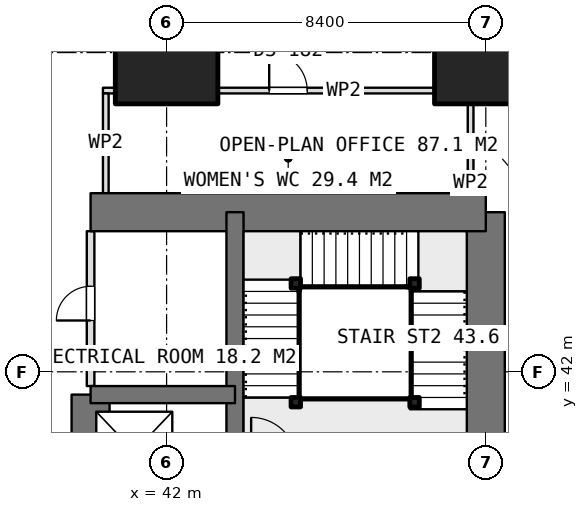
"""IFC4 building model, lengths in metres.
Left out: names, types, materials, properties, quantities, classifications, styles, units other than length and angle.
Written with IfcOpenShell. Run it as: python <this file> out.ifc"""

import sys

from ifc_helpers import new_model, si_unit, direction, frame, frame_2d, origin, origin_2d, place, context, subcontext, project, spatial, rectangle, extrude, element, fill, save


model = new_model("IFC4")
c1 = context("Model", 3, precision=1e-05, world=origin(), true_north=direction((0.0, 1.0)))
c2 = subcontext(c1, "Body", "Model", "MODEL_VIEW")
j1 = project(units=[si_unit("LENGTHUNIT", "METRE"), si_unit("PLANEANGLEUNIT", "RADIAN")], contexts=[c1])
p1 = place(None, origin())
s1 = spatial("IfcSite", under=j1, at=p1, CompositionType="ELEMENT")
p2 = place(p1, origin())
s2 = spatial("IfcBuilding", under=s1, at=p2, CompositionType="ELEMENT")
p3 = place(p2, frame((0.0, 0.0, 172.7)))
s3 = spatial("IfcBuildingStorey", under=s2, at=p3, CompositionType="ELEMENT", Elevation=172.7)
p4 = place(p3, frame((40.0, 46.2, 0.0), z_axis=(0.0, 0.0, 1.0), x_axis=(1.0, 0.0, 0.0)))
e1 = element("IfcWall", 1, at=p4, inside=s3, PredefinedType="SHEAR", context=c2, shape_type="SweptSolid", body=[
    extrude(rectangle(XDim=10.4, YDim=1.0, at=frame_2d((5.2, 0.0))), origin(), (0.0, 0.0, 1.0), 3.75),
])
p5 = place(p3, frame((50.4, 21.0, 0.0), z_axis=(0.0, 0.0, 1.0), x_axis=(0.0, 1.0, 0.0)))
e2 = element("IfcWall", 2, at=p5, inside=s3, PredefinedType="SHEAR", context=c2, shape_type="SweptSolid", body=[
    extrude(rectangle(XDim=25.2, YDim=1.0, at=frame_2d((12.6, 0.0))), origin(), (0.0, 0.0, 1.0), 3.75),
])
p6 = place(p5, frame((16.2, 0.0, 0.0)))
e3 = element("IfcOpeningElement", 3, at=p6, cuts=e2, PredefinedType="OPENING", context=c2, shape_type="SweptSolid", body=[
    extrude(rectangle(XDim=1.2, YDim=2.1, at=frame_2d((0.6, 1.05))), frame((0.0, 0.51, 0.0), z_axis=(0.0, -1.0, 0.0), x_axis=(1.0, 0.0, 0.0)), (0.0, 0.0, 1.0), 1.02),
])
p7 = place(p5, frame((10.05, 0.0, 0.0)))
e4 = element("IfcOpeningElement", 4, at=p7, cuts=e2, PredefinedType="OPENING", context=c2, shape_type="SweptSolid", body=[
    extrude(rectangle(XDim=0.9, YDim=2.1, at=frame_2d((0.45, 1.05))), frame((0.0, 0.51, 0.0), z_axis=(0.0, -1.0, 0.0), x_axis=(1.0, 0.0, 0.0)), (0.0, 0.0, 1.0), 1.02),
])
p8 = place(p5, frame((7.45, 0.0, 0.0)))
e5 = element("IfcOpeningElement", 5, at=p8, cuts=e2, PredefinedType="OPENING", context=c2, shape_type="SweptSolid", body=[
    extrude(rectangle(XDim=0.9, YDim=2.1, at=frame_2d((0.45, 1.05))), frame((0.0, 0.51, 0.0), z_axis=(0.0, -1.0, 0.0), x_axis=(1.0, 0.0, 0.0)), (0.0, 0.0, 1.0), 1.02),
])
p9 = place(p5, frame((0.7, 0.0, 0.0)))
e6 = element("IfcOpeningElement", 6, at=p9, cuts=e2, PredefinedType="OPENING", context=c2, shape_type="SweptSolid", body=[
    extrude(rectangle(XDim=1.2, YDim=2.1, at=frame_2d((0.6, 1.05))), frame((0.0, 0.51, 0.0), z_axis=(0.0, -1.0, 0.0), x_axis=(1.0, 0.0, 0.0)), (0.0, 0.0, 1.0), 1.02),
])
p10 = place(p3, frame((43.8, 21.0, 0.0), z_axis=(0.0, 0.0, 1.0), x_axis=(0.0, 1.0, 0.0)))
e7 = element("IfcWall", 7, at=p10, inside=s3, PredefinedType="SHEAR", context=c2, shape_type="SweptSolid", body=[
    extrude(rectangle(XDim=25.2, YDim=0.45, at=frame_2d((12.6, 0.0))), origin(), (0.0, 0.0, 1.0), 3.75),
])
p11 = place(p3, frame((40.0, 23.4, 0.0), z_axis=(0.0, 0.0, 1.0), x_axis=(0.0, 1.0, 0.0)))
e8 = element("IfcWall", 8, at=p11, inside=s3, PredefinedType="SHEAR", context=c2, shape_type="SweptSolid", body=[
    extrude(rectangle(XDim=18.0, YDim=1.0, at=frame_2d((9.0, 0.0))), origin(), (0.0, 0.0, 1.0), 3.75),
])
p12 = place(p11, frame((2.55, 0.0, 0.0)))
e9 = element("IfcOpeningElement", 9, at=p12, cuts=e8, PredefinedType="OPENING", context=c2, shape_type="SweptSolid", body=[
    extrude(rectangle(XDim=0.9, YDim=2.1, at=frame_2d((0.45, 1.05))), frame((0.0, 0.51, 0.0), z_axis=(0.0, -1.0, 0.0), x_axis=(1.0, 0.0, 0.0)), (0.0, 0.0, 1.0), 1.02),
])
p13 = place(p3, frame((40.0, 41.4, 0.0), z_axis=(0.0, 0.0, 1.0), x_axis=(1.0, 0.0, 0.0)))
e10 = element("IfcWall", 10, at=p13, inside=s3, PredefinedType="SHEAR", context=c2, shape_type="SweptSolid", body=[
    extrude(rectangle(XDim=3.8, YDim=0.45, at=frame_2d((1.9, 0.0))), origin(), (0.0, 0.0, 1.0), 3.75),
])
for number, where, z_axis, x_axis in (
    (11, (42.0, 50.4, 0.0), (0.0, 0.0, 1.0), (1.0, 0.0, 0.0)),
    (12, (50.4, 50.4, 0.0), (0.0, 0.0, 1.0), (1.0, 0.0, 0.0)),
):
    element("IfcColumn", number, at=place(p3, frame(where, z_axis=z_axis, x_axis=x_axis)), inside=s3, PredefinedType="COLUMN", context=c2, shape_type="SweptSolid", body=[
        extrude(rectangle(XDim=2.7, YDim=2.7, at=origin_2d()), origin(), (0.0, 0.0, 1.0), 3.75),
    ])
p14 = place(p3, frame((40.0, 41.625, 0.0), z_axis=(0.0, 0.0, 1.0), x_axis=(0.0, 1.0, 0.0)))
e13 = element("IfcWall", 13, at=p14, inside=s3, PredefinedType="PARTITIONING", context=c2, shape_type="SweptSolid", body=[
    extrude(rectangle(XDim=4.075, YDim=0.2, at=frame_2d((2.038, 0.0))), origin(), (0.0, 0.0, 1.0), 3.5),
])
p15 = place(p14, frame((1.725, 0.0, 0.0)))
e14 = element("IfcOpeningElement", 14, at=p15, cuts=e13, PredefinedType="OPENING", context=c2, shape_type="SweptSolid", body=[
    extrude(rectangle(XDim=0.9, YDim=2.1, at=frame_2d((0.45, 1.05))), frame((0.0, 0.11, 0.0), z_axis=(0.0, -1.0, 0.0), x_axis=(1.0, 0.0, 0.0)), (0.0, 0.0, 1.0), 0.22),
])
p16 = place(p3, frame((40.325, 49.4, 0.0), z_axis=(0.0, 0.0, 1.0), x_axis=(1.0, 0.0, 0.0)))
e15 = element("IfcWall", 15, at=p16, inside=s3, PredefinedType="PARTITIONING", context=c2, shape_type="SweptSolid", body=[
    extrude(rectangle(XDim=9.75, YDim=0.15, at=frame_2d((4.875, 0.0))), origin(), (0.0, 0.0, 1.0), 3.5),
])
p17 = place(p16, frame((4.375, 0.0, 0.0)))
e16 = element("IfcOpeningElement", 16, at=p17, cuts=e15, PredefinedType="OPENING", context=c2, shape_type="SweptSolid", body=[
    extrude(rectangle(XDim=1.0, YDim=2.1, at=frame_2d((0.5, 1.05))), frame((0.0, 0.085, 0.0), z_axis=(0.0, -1.0, 0.0), x_axis=(1.0, 0.0, 0.0)), (0.0, 0.0, 1.0), 0.17),
])
for number, where, z_axis, x_axis in (
    (17, (40.4, 46.7, 0.0), (0.0, 0.0, 1.0), (0.0, 1.0, 0.0)),
    (18, (50.0, 46.7, 0.0), (0.0, 0.0, 1.0), (0.0, 1.0, 0.0)),
):
    element("IfcWall", number, at=place(p3, frame(where, z_axis=z_axis, x_axis=x_axis)), inside=s3, PredefinedType="PARTITIONING", context=c2, shape_type="SweptSolid", body=[
        extrude(rectangle(XDim=2.625, YDim=0.15, at=frame_2d((1.312, 0.0))), origin(), (0.0, 0.0, 1.0), 3.5),
    ])
for number, where, z_axis, x_axis in (
    (19, (45.4, 41.2, 0.0), (0.0, 0.0, 1.0), (1.0, 0.0, 0.0)),
    (20, (45.4, 44.325, 0.0), (0.0, 0.0, 1.0), (1.0, 0.0, 0.0)),
    (21, (48.525, 44.325, 0.0), (0.0, 0.0, 1.0), (1.0, 0.0, 0.0)),
    (22, (48.525, 41.2, 0.0), (0.0, 0.0, 1.0), (1.0, 0.0, 0.0)),
):
    element("IfcColumn", number, at=place(p3, frame(where, z_axis=z_axis, x_axis=x_axis)), inside=s3, PredefinedType="COLUMN", context=c2, shape_type="SweptSolid", body=[
        extrude(rectangle(XDim=0.25, YDim=0.25, at=origin_2d()), origin(), (0.0, 0.0, 1.0), 3.75),
    ])
p18 = place(p15, origin())
e23 = element("IfcDoor", 23, at=p18, inside=s3, OperationType="SINGLE_SWING_LEFT", PredefinedType="DOOR", context=c2, shape_type="SweptSolid", body=[
    extrude(rectangle(XDim=0.9, YDim=2.1, at=frame_2d((0.45, 1.05))), frame((0.0, 0.025, 0.0), z_axis=(0.0, -1.0, 0.0), x_axis=(1.0, 0.0, 0.0)), (0.0, 0.0, 1.0), 0.05),
])
fill(e14, e23)
p19 = place(p17, origin())
e24 = element("IfcDoor", 24, at=p19, inside=s3, OperationType="SINGLE_SWING_LEFT", PredefinedType="DOOR", context=c2, shape_type="SweptSolid", body=[
    extrude(rectangle(XDim=1.0, YDim=2.1, at=frame_2d((0.5, 1.05))), frame((0.0, 0.025, 0.0), z_axis=(0.0, -1.0, 0.0), x_axis=(1.0, 0.0, 0.0)), (0.0, 0.0, 1.0), 0.05),
])
fill(e16, e24)
save(model, sys.argv[1])
